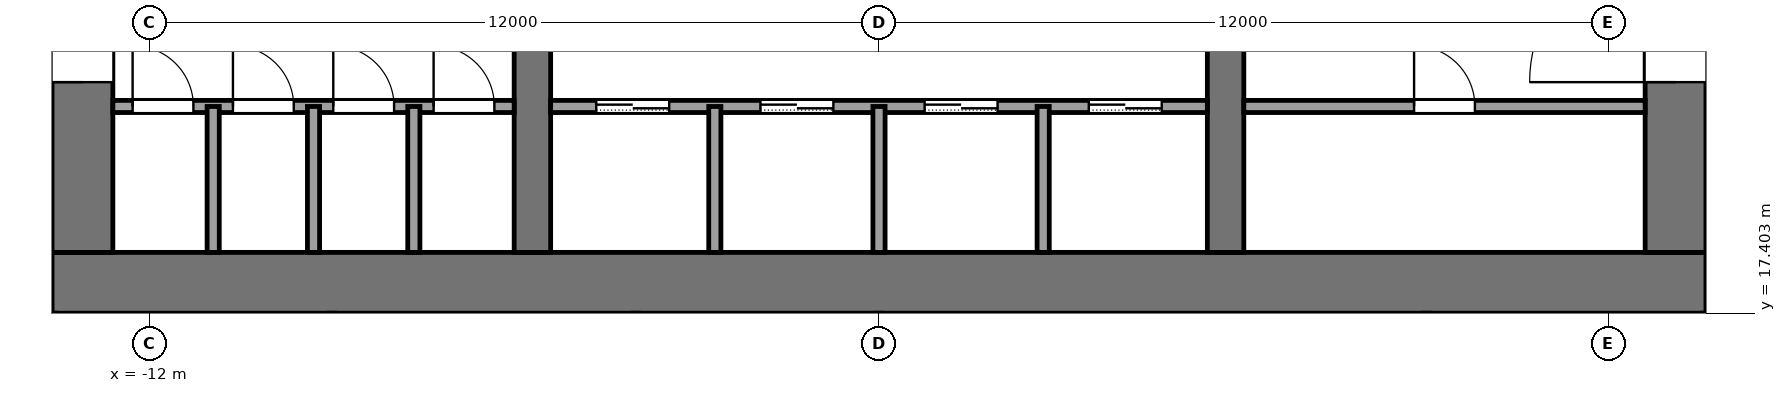
"""IFC4 building model, lengths in metres.
Left out: names, types, materials, properties, quantities, classifications, styles, units other than length and angle.
Written with IfcOpenShell. Run it as: python <this file> out.ifc"""

import sys

from ifc_helpers import new_model, si_unit, direction, frame, frame_2d, origin, place, context, subcontext, project, spatial, rectangle, extrude, element, fill, save


model = new_model("IFC4")
c1 = context("Model", 3, precision=1e-05, world=origin(), true_north=direction((0.0, 1.0)))
c2 = subcontext(c1, "Body", "Model", "MODEL_VIEW")
j1 = project(units=[si_unit("LENGTHUNIT", "METRE"), si_unit("PLANEANGLEUNIT", "RADIAN")], contexts=[c1])
p1 = place(None, origin())
s1 = spatial("IfcSite", under=j1, at=p1, CompositionType="ELEMENT")
p2 = place(p1, origin())
s2 = spatial("IfcBuilding", under=s1, at=p2, CompositionType="ELEMENT")
p3 = place(p2, frame((0.0, 0.0, 146.0)))
s3 = spatial("IfcBuildingStorey", under=s2, at=p3, CompositionType="ELEMENT", Elevation=146.0)
p4 = place(p3, frame((-13.6, 17.9, -0.13), z_axis=(0.0, 0.0, 1.0), x_axis=(1.0, 0.0, 0.0)))
e1 = element("IfcWall", 1, at=p4, inside=s3, PredefinedType="SHEAR", context=c2, shape_type="SweptSolid", body=[
    extrude(rectangle(XDim=27.2, YDim=1.0, at=frame_2d((13.6, 0.0))), origin(), (0.0, 0.0, 1.0), 4.0),
])
p5 = place(p3, frame((-13.1, 18.4, -0.13), z_axis=(0.0, 0.0, 1.0), x_axis=(0.0, 1.0, 0.0)))
e2 = element("IfcWall", 2, at=p5, inside=s3, PredefinedType="SHEAR", context=c2, shape_type="SweptSolid", body=[
    extrude(rectangle(XDim=19.2, YDim=1.0, at=frame_2d((9.6, 0.0))), origin(), (0.0, 0.0, 1.0), 4.0),
])
p6 = place(p5, frame((2.8, 0.0, 0.13)))
e3 = element("IfcOpeningElement", 3, at=p6, cuts=e2, PredefinedType="OPENING", context=c2, shape_type="SweptSolid", body=[
    extrude(rectangle(XDim=2.4, YDim=2.4, at=frame_2d((1.2, 1.2))), frame((0.0, 0.51, 0.0), z_axis=(0.0, -1.0, 0.0), x_axis=(1.0, 0.0, 0.0)), (0.0, 0.0, 1.0), 1.02),
])
p7 = place(p5, frame((13.4, 0.0, 0.13)))
e4 = element("IfcOpeningElement", 4, at=p7, cuts=e2, PredefinedType="OPENING", context=c2, shape_type="SweptSolid", body=[
    extrude(rectangle(XDim=1.4, YDim=2.2, at=frame_2d((0.7, 1.1))), frame((0.0, 0.51, 0.0), z_axis=(0.0, -1.0, 0.0), x_axis=(1.0, 0.0, 0.0)), (0.0, 0.0, 1.0), 1.02),
])
p8 = place(p3, frame((13.1, 18.4, -0.13), z_axis=(0.0, 0.0, 1.0), x_axis=(0.0, 1.0, 0.0)))
e5 = element("IfcWall", 5, at=p8, inside=s3, PredefinedType="SHEAR", context=c2, shape_type="SweptSolid", body=[
    extrude(rectangle(XDim=19.2, YDim=1.0, at=frame_2d((9.6, 0.0))), origin(), (0.0, 0.0, 1.0), 4.0),
])
p9 = place(p8, frame((2.8, 0.0, 0.13)))
e6 = element("IfcOpeningElement", 6, at=p9, cuts=e5, PredefinedType="OPENING", context=c2, shape_type="SweptSolid", body=[
    extrude(rectangle(XDim=2.4, YDim=2.4, at=frame_2d((1.2, 1.2))), frame((0.0, 0.51, 0.0), z_axis=(0.0, -1.0, 0.0), x_axis=(1.0, 0.0, 0.0)), (0.0, 0.0, 1.0), 1.02),
])
p10 = place(p8, frame((13.3, 0.0, 0.13)))
e7 = element("IfcOpeningElement", 7, at=p10, cuts=e5, PredefinedType="OPENING", context=c2, shape_type="SweptSolid", body=[
    extrude(rectangle(XDim=2.4, YDim=2.4, at=frame_2d((1.2, 1.2))), frame((0.0, 0.51, 0.0), z_axis=(0.0, -1.0, 0.0), x_axis=(1.0, 0.0, 0.0)), (0.0, 0.0, 1.0), 1.02),
])
p11 = place(p3, frame((-5.7, 18.4, -0.13), z_axis=(0.0, 0.0, 1.0), x_axis=(0.0, 1.0, 0.0)))
e8 = element("IfcWall", 8, at=p11, inside=s3, PredefinedType="SHEAR", context=c2, shape_type="SweptSolid", body=[
    extrude(rectangle(XDim=19.2, YDim=0.6, at=frame_2d((9.6, 0.0))), origin(), (0.0, 0.0, 1.0), 4.0),
])
p12 = place(p11, frame((8.35, 0.0, 0.13)))
e9 = element("IfcOpeningElement", 9, at=p12, cuts=e8, PredefinedType="OPENING", context=c2, shape_type="SweptSolid", body=[
    extrude(rectangle(XDim=0.9, YDim=2.1, at=frame_2d((0.45, 1.05))), frame((0.0, 0.31, 0.0), z_axis=(0.0, -1.0, 0.0), x_axis=(1.0, 0.0, 0.0)), (0.0, 0.0, 1.0), 0.62),
])
p13 = place(p3, frame((5.7, 18.4, -0.13), z_axis=(0.0, 0.0, 1.0), x_axis=(0.0, 1.0, 0.0)))
e10 = element("IfcWall", 10, at=p13, inside=s3, PredefinedType="SHEAR", context=c2, shape_type="SweptSolid", body=[
    extrude(rectangle(XDim=19.2, YDim=0.6, at=frame_2d((9.6, 0.0))), origin(), (0.0, 0.0, 1.0), 4.0),
])
p14 = place(p13, frame((8.35, 0.0, 0.13)))
e11 = element("IfcOpeningElement", 11, at=p14, cuts=e10, PredefinedType="OPENING", context=c2, shape_type="SweptSolid", body=[
    extrude(rectangle(XDim=0.9, YDim=2.1, at=frame_2d((0.45, 1.05))), frame((0.0, 0.31, 0.0), z_axis=(0.0, -1.0, 0.0), x_axis=(1.0, 0.0, 0.0)), (0.0, 0.0, 1.0), 0.62),
])
p15 = place(p13, frame((13.3, 0.0, 0.13)))
e12 = element("IfcOpeningElement", 12, at=p15, cuts=e10, PredefinedType="OPENING", context=c2, shape_type="SweptSolid", body=[
    extrude(rectangle(XDim=2.4, YDim=2.4, at=frame_2d((1.2, 1.2))), frame((0.0, 0.31, 0.0), z_axis=(0.0, -1.0, 0.0), x_axis=(1.0, 0.0, 0.0)), (0.0, 0.0, 1.0), 0.62),
])
p16 = place(p3, frame((-12.6, 20.8, 0.0), z_axis=(0.0, 0.0, 1.0), x_axis=(1.0, 0.0, 0.0)))
e13 = element("IfcWall", 13, at=p16, inside=s3, PredefinedType="PARTITIONING", context=c2, shape_type="SweptSolid", body=[
    extrude(rectangle(XDim=6.6, YDim=0.2, at=frame_2d((3.3, 0.0))), origin(), (0.0, 0.0, 1.0), 3.87),
])
p17 = place(p16, frame((0.325, 0.0, 0.0)))
e14 = element("IfcOpeningElement", 14, at=p17, cuts=e13, PredefinedType="OPENING", context=c2, shape_type="SweptSolid", body=[
    extrude(rectangle(XDim=1.0, YDim=2.1, at=frame_2d((0.5, 1.05))), frame((0.0, 0.11, 0.0), z_axis=(0.0, -1.0, 0.0), x_axis=(1.0, 0.0, 0.0)), (0.0, 0.0, 1.0), 0.22),
])
p18 = place(p16, frame((1.975, 0.0, 0.0)))
e15 = element("IfcOpeningElement", 15, at=p18, cuts=e13, PredefinedType="OPENING", context=c2, shape_type="SweptSolid", body=[
    extrude(rectangle(XDim=1.0, YDim=2.1, at=frame_2d((0.5, 1.05))), frame((0.0, 0.11, 0.0), z_axis=(0.0, -1.0, 0.0), x_axis=(1.0, 0.0, 0.0)), (0.0, 0.0, 1.0), 0.22),
])
p19 = place(p16, frame((3.625, 0.0, 0.0)))
e16 = element("IfcOpeningElement", 16, at=p19, cuts=e13, PredefinedType="OPENING", context=c2, shape_type="SweptSolid", body=[
    extrude(rectangle(XDim=1.0, YDim=2.1, at=frame_2d((0.5, 1.05))), frame((0.0, 0.11, 0.0), z_axis=(0.0, -1.0, 0.0), x_axis=(1.0, 0.0, 0.0)), (0.0, 0.0, 1.0), 0.22),
])
p20 = place(p16, frame((5.275, 0.0, 0.0)))
e17 = element("IfcOpeningElement", 17, at=p20, cuts=e13, PredefinedType="OPENING", context=c2, shape_type="SweptSolid", body=[
    extrude(rectangle(XDim=1.0, YDim=2.1, at=frame_2d((0.5, 1.05))), frame((0.0, 0.11, 0.0), z_axis=(0.0, -1.0, 0.0), x_axis=(1.0, 0.0, 0.0)), (0.0, 0.0, 1.0), 0.22),
])
p21 = place(p3, frame((-5.4, 20.8, 0.0), z_axis=(0.0, 0.0, 1.0), x_axis=(1.0, 0.0, 0.0)))
e18 = element("IfcWall", 18, at=p21, inside=s3, PredefinedType="PARTITIONING", context=c2, shape_type="SweptSolid", body=[
    extrude(rectangle(XDim=10.8, YDim=0.2, at=frame_2d((5.4, 0.0))), origin(), (0.0, 0.0, 1.0), 3.87),
])
p22 = place(p21, frame((0.75, 0.0, 0.0)))
e19 = element("IfcOpeningElement", 19, at=p22, cuts=e18, PredefinedType="OPENING", context=c2, shape_type="SweptSolid", body=[
    extrude(rectangle(XDim=1.2, YDim=2.2, at=frame_2d((0.6, 1.1))), frame((0.0, 0.11, 0.0), z_axis=(0.0, -1.0, 0.0), x_axis=(1.0, 0.0, 0.0)), (0.0, 0.0, 1.0), 0.22),
])
p23 = place(p21, frame((3.45, 0.0, 0.0)))
e20 = element("IfcOpeningElement", 20, at=p23, cuts=e18, PredefinedType="OPENING", context=c2, shape_type="SweptSolid", body=[
    extrude(rectangle(XDim=1.2, YDim=2.2, at=frame_2d((0.6, 1.1))), frame((0.0, 0.11, 0.0), z_axis=(0.0, -1.0, 0.0), x_axis=(1.0, 0.0, 0.0)), (0.0, 0.0, 1.0), 0.22),
])
p24 = place(p21, frame((6.15, 0.0, 0.0)))
e21 = element("IfcOpeningElement", 21, at=p24, cuts=e18, PredefinedType="OPENING", context=c2, shape_type="SweptSolid", body=[
    extrude(rectangle(XDim=1.2, YDim=2.2, at=frame_2d((0.6, 1.1))), frame((0.0, 0.11, 0.0), z_axis=(0.0, -1.0, 0.0), x_axis=(1.0, 0.0, 0.0)), (0.0, 0.0, 1.0), 0.22),
])
p25 = place(p21, frame((8.85, 0.0, 0.0)))
e22 = element("IfcOpeningElement", 22, at=p25, cuts=e18, PredefinedType="OPENING", context=c2, shape_type="SweptSolid", body=[
    extrude(rectangle(XDim=1.2, YDim=2.2, at=frame_2d((0.6, 1.1))), frame((0.0, 0.11, 0.0), z_axis=(0.0, -1.0, 0.0), x_axis=(1.0, 0.0, 0.0)), (0.0, 0.0, 1.0), 0.22),
])
p26 = place(p3, frame((6.0, 20.8, 0.0), z_axis=(0.0, 0.0, 1.0), x_axis=(1.0, 0.0, 0.0)))
e23 = element("IfcWall", 23, at=p26, inside=s3, PredefinedType="PARTITIONING", context=c2, shape_type="SweptSolid", body=[
    extrude(rectangle(XDim=6.6, YDim=0.2, at=frame_2d((3.3, 0.0))), origin(), (0.0, 0.0, 1.0), 3.87),
])
p27 = place(p26, frame((2.8, 0.0, 0.0)))
e24 = element("IfcOpeningElement", 24, at=p27, cuts=e23, PredefinedType="OPENING", context=c2, shape_type="SweptSolid", body=[
    extrude(rectangle(XDim=1.0, YDim=2.1, at=frame_2d((0.5, 1.05))), frame((0.0, 0.11, 0.0), z_axis=(0.0, -1.0, 0.0), x_axis=(1.0, 0.0, 0.0)), (0.0, 0.0, 1.0), 0.22),
])
for number, where, z_axis, x_axis in (
    (25, (-10.95, 18.4, 0.0), (0.0, 0.0, 1.0), (0.0, 1.0, 0.0)),
    (26, (-9.3, 18.4, 0.0), (0.0, 0.0, 1.0), (0.0, 1.0, 0.0)),
    (27, (-7.65, 18.4, 0.0), (0.0, 0.0, 1.0), (0.0, 1.0, 0.0)),
    (28, (-2.7, 18.4, 0.0), (0.0, 0.0, 1.0), (0.0, 1.0, 0.0)),
    (29, (0.0, 18.4, 0.0), (0.0, 0.0, 1.0), (0.0, 1.0, 0.0)),
    (30, (2.7, 18.4, 0.0), (0.0, 0.0, 1.0), (0.0, 1.0, 0.0)),
):
    element("IfcWall", number, at=place(p3, frame(where, z_axis=z_axis, x_axis=x_axis)), inside=s3, PredefinedType="PARTITIONING", context=c2, shape_type="SweptSolid", body=[
        extrude(rectangle(XDim=2.4, YDim=0.2, at=frame_2d((1.2, 0.0))), origin(), (0.0, 0.0, 1.0), 3.87),
    ])
p28 = place(p22, origin())
e31 = element("IfcDoor", 31, at=p28, inside=s3, OperationType="SLIDING_TO_LEFT", PredefinedType="DOOR", context=c2, shape_type="SweptSolid", body=[
    extrude(rectangle(XDim=1.2, YDim=2.2, at=frame_2d((0.6, 1.1))), frame((0.0, 0.025, 0.0), z_axis=(0.0, -1.0, 0.0), x_axis=(1.0, 0.0, 0.0)), (0.0, 0.0, 1.0), 0.05),
])
fill(e19, e31)
p29 = place(p23, origin())
e32 = element("IfcDoor", 32, at=p29, inside=s3, OperationType="SLIDING_TO_LEFT", PredefinedType="DOOR", context=c2, shape_type="SweptSolid", body=[
    extrude(rectangle(XDim=1.2, YDim=2.2, at=frame_2d((0.6, 1.1))), frame((0.0, 0.025, 0.0), z_axis=(0.0, -1.0, 0.0), x_axis=(1.0, 0.0, 0.0)), (0.0, 0.0, 1.0), 0.05),
])
fill(e20, e32)
p30 = place(p24, origin())
e33 = element("IfcDoor", 33, at=p30, inside=s3, OperationType="SLIDING_TO_LEFT", PredefinedType="DOOR", context=c2, shape_type="SweptSolid", body=[
    extrude(rectangle(XDim=1.2, YDim=2.2, at=frame_2d((0.6, 1.1))), frame((0.0, 0.025, 0.0), z_axis=(0.0, -1.0, 0.0), x_axis=(1.0, 0.0, 0.0)), (0.0, 0.0, 1.0), 0.05),
])
fill(e21, e33)
p31 = place(p25, origin())
e34 = element("IfcDoor", 34, at=p31, inside=s3, OperationType="SLIDING_TO_LEFT", PredefinedType="DOOR", context=c2, shape_type="SweptSolid", body=[
    extrude(rectangle(XDim=1.2, YDim=2.2, at=frame_2d((0.6, 1.1))), frame((0.0, 0.025, 0.0), z_axis=(0.0, -1.0, 0.0), x_axis=(1.0, 0.0, 0.0)), (0.0, 0.0, 1.0), 0.05),
])
fill(e22, e34)
p32 = place(p17, origin())
e35 = element("IfcDoor", 35, at=p32, inside=s3, OperationType="SINGLE_SWING_RIGHT", PredefinedType="DOOR", context=c2, shape_type="SweptSolid", body=[
    extrude(rectangle(XDim=1.0, YDim=2.1, at=frame_2d((0.5, 1.05))), frame((0.0, 0.025, 0.0), z_axis=(0.0, -1.0, 0.0), x_axis=(1.0, 0.0, 0.0)), (0.0, 0.0, 1.0), 0.05),
])
fill(e14, e35)
p33 = place(p18, origin())
e36 = element("IfcDoor", 36, at=p33, inside=s3, OperationType="SINGLE_SWING_RIGHT", PredefinedType="DOOR", context=c2, shape_type="SweptSolid", body=[
    extrude(rectangle(XDim=1.0, YDim=2.1, at=frame_2d((0.5, 1.05))), frame((0.0, 0.025, 0.0), z_axis=(0.0, -1.0, 0.0), x_axis=(1.0, 0.0, 0.0)), (0.0, 0.0, 1.0), 0.05),
])
fill(e15, e36)
p34 = place(p19, origin())
e37 = element("IfcDoor", 37, at=p34, inside=s3, OperationType="SINGLE_SWING_LEFT", PredefinedType="DOOR", context=c2, shape_type="SweptSolid", body=[
    extrude(rectangle(XDim=1.0, YDim=2.1, at=frame_2d((0.5, 1.05))), frame((0.0, 0.025, 0.0), z_axis=(0.0, -1.0, 0.0), x_axis=(1.0, 0.0, 0.0)), (0.0, 0.0, 1.0), 0.05),
])
fill(e16, e37)
p35 = place(p20, origin())
e38 = element("IfcDoor", 38, at=p35, inside=s3, OperationType="SINGLE_SWING_LEFT", PredefinedType="DOOR", context=c2, shape_type="SweptSolid", body=[
    extrude(rectangle(XDim=1.0, YDim=2.1, at=frame_2d((0.5, 1.05))), frame((0.0, 0.025, 0.0), z_axis=(0.0, -1.0, 0.0), x_axis=(1.0, 0.0, 0.0)), (0.0, 0.0, 1.0), 0.05),
])
fill(e17, e38)
p36 = place(p27, origin())
e39 = element("IfcDoor", 39, at=p36, inside=s3, OperationType="SINGLE_SWING_LEFT", PredefinedType="DOOR", context=c2, shape_type="SweptSolid", body=[
    extrude(rectangle(XDim=1.0, YDim=2.1, at=frame_2d((0.5, 1.05))), frame((0.0, 0.025, 0.0), z_axis=(0.0, -1.0, 0.0), x_axis=(1.0, 0.0, 0.0)), (0.0, 0.0, 1.0), 0.05),
])
fill(e24, e39)
p37 = place(p6, origin())
e40 = element("IfcDoor", 40, at=p37, inside=s3, OperationType="DOUBLE_DOOR_SINGLE_SWING", PredefinedType="DOOR", context=c2, shape_type="SweptSolid", body=[
    extrude(rectangle(XDim=2.4, YDim=2.4, at=frame_2d((1.2, 1.2))), frame((0.0, 0.025, 0.0), z_axis=(0.0, -1.0, 0.0), x_axis=(1.0, 0.0, 0.0)), (0.0, 0.0, 1.0), 0.05),
])
fill(e3, e40)
p38 = place(p9, origin())
e41 = element("IfcDoor", 41, at=p38, inside=s3, OperationType="DOUBLE_DOOR_SINGLE_SWING", PredefinedType="DOOR", context=c2, shape_type="SweptSolid", body=[
    extrude(rectangle(XDim=2.4, YDim=2.4, at=frame_2d((1.2, 1.2))), frame((0.0, 0.025, 0.0), z_axis=(0.0, -1.0, 0.0), x_axis=(1.0, 0.0, 0.0)), (0.0, 0.0, 1.0), 0.05),
])
fill(e6, e41)
save(model, sys.argv[1])
